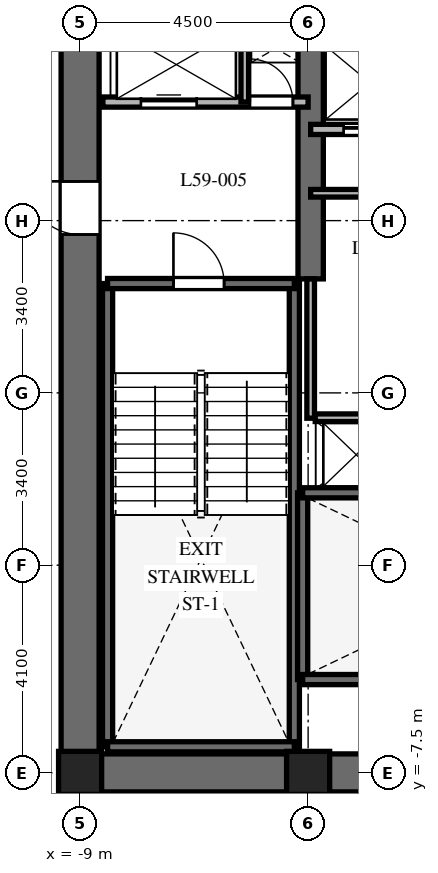
"""IFC4 building model, lengths in metres.
Left out: names, types, materials, properties, quantities, classifications, styles, units other than length and angle.
Written with IfcOpenShell. Run it as: python <this file> out.ifc"""

import sys

from ifc_helpers import new_model, si_unit, direction, frame, frame_2d, origin, origin_2d, place, context, subcontext, project, spatial, rectangle, extrude, element, fill, save


model = new_model("IFC4")
c1 = context("Model", 3, precision=1e-05, world=origin(), true_north=direction((0.0, 1.0)))
c2 = subcontext(c1, "Body", "Model", "MODEL_VIEW")
j1 = project(units=[si_unit("LENGTHUNIT", "METRE"), si_unit("PLANEANGLEUNIT", "RADIAN")], contexts=[c1])
p1 = place(None, origin())
s1 = spatial("IfcSite", under=j1, at=p1, CompositionType="ELEMENT")
p2 = place(p1, origin())
s2 = spatial("IfcBuilding", under=s1, at=p2, CompositionType="ELEMENT")
p3 = place(p2, frame((0.0, 0.0, 236.9)))
s3 = spatial("IfcBuildingStorey", under=s2, at=p3, CompositionType="ELEMENT", Elevation=236.9)
p4 = place(p3, frame((-9.375, -7.5, 0.0), z_axis=(0.0, 0.0, 1.0), x_axis=(1.0, 0.0, 0.0)))
e1 = element("IfcWall", 1, at=p4, inside=s3, PredefinedType="SHEAR", context=c2, shape_type="SweptSolid", body=[
    extrude(rectangle(XDim=18.75, YDim=0.75, at=frame_2d((9.375, 0.0))), origin(), (0.0, 0.0, 1.0), 3.8),
])
p5 = place(p4, frame((9.425, 0.0, 0.0)))
e2 = element("IfcOpeningElement", 2, at=p5, cuts=e1, PredefinedType="OPENING", context=c2, shape_type="SweptSolid", body=[
    extrude(rectangle(XDim=1.0, YDim=2.15, at=frame_2d((0.5, 1.075))), frame((0.0, 0.385, 0.0), z_axis=(0.0, -1.0, 0.0), x_axis=(1.0, 0.0, 0.0)), (0.0, 0.0, 1.0), 0.77),
])
p6 = place(p3, frame((-9.0, -7.125, 0.0), z_axis=(0.0, 0.0, 1.0), x_axis=(0.0, 1.0, 0.0)))
e3 = element("IfcWall", 3, at=p6, inside=s3, PredefinedType="SHEAR", context=c2, shape_type="SweptSolid", body=[
    extrude(rectangle(XDim=14.25, YDim=0.75, at=frame_2d((7.125, 0.0))), origin(), (0.0, 0.0, 1.0), 3.8),
])
p7 = place(p6, frame((10.25, 0.0, 0.0)))
e4 = element("IfcOpeningElement", 4, at=p7, cuts=e3, PredefinedType="OPENING", context=c2, shape_type="SweptSolid", body=[
    extrude(rectangle(XDim=1.05, YDim=2.15, at=frame_2d((0.525, 1.075))), frame((0.0, 0.385, 0.0), z_axis=(0.0, -1.0, 0.0), x_axis=(1.0, 0.0, 0.0)), (0.0, 0.0, 1.0), 0.77),
])
p8 = place(p3, frame((-4.45, 2.25, 0.0), z_axis=(0.0, 0.0, 1.0), x_axis=(0.0, 1.0, 0.0)))
e5 = element("IfcWall", 5, at=p8, inside=s3, PredefinedType="SHEAR", context=c2, shape_type="SweptSolid", body=[
    extrude(rectangle(XDim=4.875, YDim=0.5, at=frame_2d((2.438, 0.0))), origin(), (0.0, 0.0, 1.0), 3.8),
])
for number, where, z_axis, x_axis in (
    (6, (-8.458, -6.985, 0.0), (0.0, 0.0, 1.0), (0.0, 1.0, 0.0)),
    (7, (-4.772, -6.985, 0.0), (0.0, 0.0, 1.0), (0.0, 1.0, 0.0)),
):
    element("IfcWall", number, at=place(p3, frame(where, z_axis=z_axis, x_axis=x_axis)), inside=s3, PredefinedType="SHEAR", context=c2, shape_type="SweptSolid", body=[
        extrude(rectangle(XDim=9.143, YDim=0.2, at=frame_2d((4.572, 0.0))), origin(), (0.0, 0.0, 1.0), 3.8),
    ])
p9 = place(p3, frame((-8.458, -6.985, 0.0), z_axis=(0.0, 0.0, 1.0), x_axis=(1.0, 0.0, 0.0)))
e8 = element("IfcWall", 8, at=p9, inside=s3, PredefinedType="SHEAR", context=c2, shape_type="SweptSolid", body=[
    extrude(rectangle(XDim=3.686, YDim=0.2, at=frame_2d((1.843, 0.0))), origin(), (0.0, 0.0, 1.0), 3.8),
])
p10 = place(p3, frame((-8.458, 2.158, 0.0), z_axis=(0.0, 0.0, 1.0), x_axis=(1.0, 0.0, 0.0)))
e9 = element("IfcWall", 9, at=p10, inside=s3, PredefinedType="SHEAR", context=c2, shape_type="SweptSolid", body=[
    extrude(rectangle(XDim=3.686, YDim=0.2, at=frame_2d((1.843, 0.0))), origin(), (0.0, 0.0, 1.0), 3.8),
])
p11 = place(p10, frame((1.3, 0.0, 0.0)))
e10 = element("IfcOpeningElement", 10, at=p11, cuts=e9, PredefinedType="OPENING", context=c2, shape_type="SweptSolid", body=[
    extrude(rectangle(XDim=1.0, YDim=2.15, at=frame_2d((0.5, 1.075))), frame((0.0, 0.11, 0.0), z_axis=(0.0, -1.0, 0.0), x_axis=(1.0, 0.0, 0.0)), (0.0, 0.0, 1.0), 0.22),
])
p12 = place(p3, frame((-4.608, -5.658, 0.0), z_axis=(0.0, 0.0, 1.0), x_axis=(0.0, 1.0, 0.0)))
e11 = element("IfcWall", 11, at=p12, inside=s3, PredefinedType="SHEAR", context=c2, shape_type="SweptSolid", body=[
    extrude(rectangle(XDim=3.686, YDim=0.2, at=frame_2d((1.843, 0.0))), origin(), (0.0, 0.0, 1.0), 3.8),
])
p13 = place(p3, frame((-4.608, -5.658, 0.0), z_axis=(0.0, 0.0, 1.0), x_axis=(1.0, 0.0, 0.0)))
e12 = element("IfcWall", 12, at=p13, inside=s3, PredefinedType="SHEAR", context=c2, shape_type="SweptSolid", body=[
    extrude(rectangle(XDim=9.166, YDim=0.2, at=frame_2d((4.583, 0.0))), origin(), (0.0, 0.0, 1.0), 3.8),
])
p14 = place(p13, frame((7.45, 0.0, 0.0)))
e13 = element("IfcOpeningElement", 13, at=p14, cuts=e12, PredefinedType="OPENING", context=c2, shape_type="SweptSolid", body=[
    extrude(rectangle(XDim=1.0, YDim=2.15, at=frame_2d((0.5, 1.075))), frame((0.0, 0.11, 0.0), z_axis=(0.0, -1.0, 0.0), x_axis=(1.0, 0.0, 0.0)), (0.0, 0.0, 1.0), 0.22),
])
p15 = place(p3, frame((-4.608, -1.972, 0.0), z_axis=(0.0, 0.0, 1.0), x_axis=(1.0, 0.0, 0.0)))
e14 = element("IfcWall", 14, at=p15, inside=s3, PredefinedType="SHEAR", context=c2, shape_type="SweptSolid", body=[
    extrude(rectangle(XDim=9.166, YDim=0.2, at=frame_2d((4.583, 0.0))), origin(), (0.0, 0.0, 1.0), 3.8),
])
for number, where, z_axis, x_axis in (
    (15, (-9.0, -7.5, 0.0), (0.0, 0.0, 1.0), (1.0, 0.0, 0.0)),
    (16, (-4.5, -7.5, 0.0), (0.0, 0.0, 1.0), (1.0, 0.0, 0.0)),
):
    element("IfcColumn", number, at=place(p3, frame(where, z_axis=z_axis, x_axis=x_axis)), inside=s3, PredefinedType="COLUMN", context=c2, shape_type="SweptSolid", body=[
        extrude(rectangle(XDim=0.85, YDim=0.85, at=origin_2d()), origin(), (0.0, 0.0, 1.0), 3.8),
    ])
p16 = place(p3, frame((-8.55, 5.74, 0.0), z_axis=(0.0, 0.0, 1.0), x_axis=(1.0, 0.0, 0.0)))
e17 = element("IfcWall", 17, at=p16, inside=s3, PredefinedType="PARTITIONING", context=c2, shape_type="SweptSolid", body=[
    extrude(rectangle(XDim=4.05, YDim=0.2, at=frame_2d((2.025, 0.0))), origin(), (0.0, 0.0, 1.0), 3.5),
])
p17 = place(p16, frame((0.75, 0.0, 0.0)))
e18 = element("IfcOpeningElement", 18, at=p17, cuts=e17, PredefinedType="OPENING", context=c2, shape_type="SweptSolid", body=[
    extrude(rectangle(XDim=1.1, YDim=2.2, at=frame_2d((0.55, 1.1))), frame((0.0, 0.11, 0.0), z_axis=(0.0, -1.0, 0.0), x_axis=(1.0, 0.0, 0.0)), (0.0, 0.0, 1.0), 0.22),
])
p18 = place(p16, frame((2.9, 0.0, 0.0)))
e19 = element("IfcOpeningElement", 19, at=p18, cuts=e17, PredefinedType="OPENING", context=c2, shape_type="SweptSolid", body=[
    extrude(rectangle(XDim=0.85, YDim=2.03, at=frame_2d((0.425, 1.015))), frame((0.0, 0.11, 0.0), z_axis=(0.0, -1.0, 0.0), x_axis=(1.0, 0.0, 0.0)), (0.0, 0.0, 1.0), 0.22),
])
p19 = place(p3, frame((-5.75, 5.74, 0.0), z_axis=(0.0, 0.0, 1.0), x_axis=(0.0, 1.0, 0.0)))
e20 = element("IfcWall", 20, at=p19, inside=s3, PredefinedType="PARTITIONING", context=c2, shape_type="SweptSolid", body=[
    extrude(rectangle(XDim=1.41, YDim=0.15, at=frame_2d((0.705, 0.0))), origin(), (0.0, 0.0, 1.0), 3.5),
])
p20 = place(p3, frame((-4.45, 5.2, 0.0), z_axis=(0.0, 0.0, 1.0), x_axis=(1.0, 0.0, 0.0)))
e21 = element("IfcWall", 21, at=p20, inside=s3, PredefinedType="PARTITIONING", context=c2, shape_type="SweptSolid", body=[
    extrude(rectangle(XDim=4.5, YDim=0.2, at=frame_2d((2.25, 0.0))), origin(), (0.0, 0.0, 1.0), 3.5),
])
p21 = place(p20, frame((0.65, 0.0, 0.0)))
e22 = element("IfcOpeningElement", 22, at=p21, cuts=e21, PredefinedType="OPENING", context=c2, shape_type="SweptSolid", body=[
    extrude(rectangle(XDim=1.0, YDim=2.2, at=frame_2d((0.5, 1.1))), frame((0.0, 0.11, 0.0), z_axis=(0.0, -1.0, 0.0), x_axis=(1.0, 0.0, 0.0)), (0.0, 0.0, 1.0), 0.22),
])
p22 = place(p20, frame((2.85, 0.0, 0.0)))
e23 = element("IfcOpeningElement", 23, at=p22, cuts=e21, PredefinedType="OPENING", context=c2, shape_type="SweptSolid", body=[
    extrude(rectangle(XDim=1.0, YDim=2.2, at=frame_2d((0.5, 1.1))), frame((0.0, 0.11, 0.0), z_axis=(0.0, -1.0, 0.0), x_axis=(1.0, 0.0, 0.0)), (0.0, 0.0, 1.0), 0.22),
])
p23 = place(p3, frame((-4.45, -0.5, 0.0), z_axis=(0.0, 0.0, 1.0), x_axis=(0.0, 1.0, 0.0)))
e24 = element("IfcWall", 24, at=p23, inside=s3, PredefinedType="PARTITIONING", context=c2, shape_type="SweptSolid", body=[
    extrude(rectangle(XDim=2.75, YDim=0.15, at=frame_2d((1.375, 0.0))), origin(), (0.0, 0.0, 1.0), 3.5),
])
p24 = place(p3, frame((-4.45, 3.94, 0.0), z_axis=(0.0, 0.0, 1.0), x_axis=(1.0, 0.0, 0.0)))
e25 = element("IfcWall", 25, at=p24, inside=s3, PredefinedType="PARTITIONING", context=c2, shape_type="SweptSolid", body=[
    extrude(rectangle(XDim=2.55, YDim=0.15, at=frame_2d((1.275, 0.0))), origin(), (0.0, 0.0, 1.0), 3.5),
])
p25 = place(p3, frame((-4.36, -0.49, 0.0), z_axis=(0.0, 0.0, 1.0), x_axis=(1.0, 0.0, 0.0)))
e26 = element("IfcWall", 26, at=p25, inside=s3, PredefinedType="PARTITIONING", context=c2, shape_type="SweptSolid", body=[
    extrude(rectangle(XDim=8.72, YDim=0.15, at=frame_2d((4.36, 0.0))), origin(), (0.0, 0.0, 1.0), 3.5),
])
p26 = place(p25, frame((3.86, 0.0, 0.0)))
e27 = element("IfcOpeningElement", 27, at=p26, cuts=e26, PredefinedType="OPENING", context=c2, shape_type="SweptSolid", body=[
    extrude(rectangle(XDim=0.9, YDim=2.03, at=frame_2d((0.45, 1.015))), frame((0.0, 0.085, 0.0), z_axis=(0.0, -1.0, 0.0), x_axis=(1.0, 0.0, 0.0)), (0.0, 0.0, 1.0), 0.17),
])
p27 = place(p11, origin())
e28 = element("IfcDoor", 28, at=p27, inside=s3, OperationType="SINGLE_SWING_LEFT", PredefinedType="DOOR", context=c2, shape_type="SweptSolid", body=[
    extrude(rectangle(XDim=1.0, YDim=2.15, at=frame_2d((0.5, 1.075))), frame((0.0, 0.025, 0.0), z_axis=(0.0, -1.0, 0.0), x_axis=(1.0, 0.0, 0.0)), (0.0, 0.0, 1.0), 0.05),
])
fill(e10, e28)
p28 = place(p7, origin())
e29 = element("IfcDoor", 29, at=p28, inside=s3, OperationType="SINGLE_SWING_RIGHT", PredefinedType="DOOR", context=c2, shape_type="SweptSolid", body=[
    extrude(rectangle(XDim=1.05, YDim=2.15, at=frame_2d((0.525, 1.075))), frame((0.0, 0.025, 0.0), z_axis=(0.0, -1.0, 0.0), x_axis=(1.0, 0.0, 0.0)), (0.0, 0.0, 1.0), 0.05),
])
fill(e4, e29)
p29 = place(p17, origin())
e30 = element("IfcDoor", 30, at=p29, inside=s3, OperationType="SLIDING_TO_LEFT", PredefinedType="DOOR", context=c2, shape_type="SweptSolid", body=[
    extrude(rectangle(XDim=1.1, YDim=2.2, at=frame_2d((0.55, 1.1))), frame((0.0, 0.025, 0.0), z_axis=(0.0, -1.0, 0.0), x_axis=(1.0, 0.0, 0.0)), (0.0, 0.0, 1.0), 0.05),
])
fill(e18, e30)
p30 = place(p18, origin())
e31 = element("IfcDoor", 31, at=p30, inside=s3, OperationType="SINGLE_SWING_LEFT", PredefinedType="DOOR", context=c2, shape_type="SweptSolid", body=[
    extrude(rectangle(XDim=0.85, YDim=2.03, at=frame_2d((0.425, 1.015))), frame((0.0, 0.025, 0.0), z_axis=(0.0, -1.0, 0.0), x_axis=(1.0, 0.0, 0.0)), (0.0, 0.0, 1.0), 0.05),
])
fill(e19, e31)
p31 = place(p21, origin())
e32 = element("IfcDoor", 32, at=p31, inside=s3, OperationType="SLIDING_TO_LEFT", PredefinedType="DOOR", context=c2, shape_type="SweptSolid", body=[
    extrude(rectangle(XDim=1.0, YDim=2.2, at=frame_2d((0.5, 1.1))), frame((0.0, 0.025, 0.0), z_axis=(0.0, -1.0, 0.0), x_axis=(1.0, 0.0, 0.0)), (0.0, 0.0, 1.0), 0.05),
])
fill(e22, e32)
save(model, sys.argv[1])
